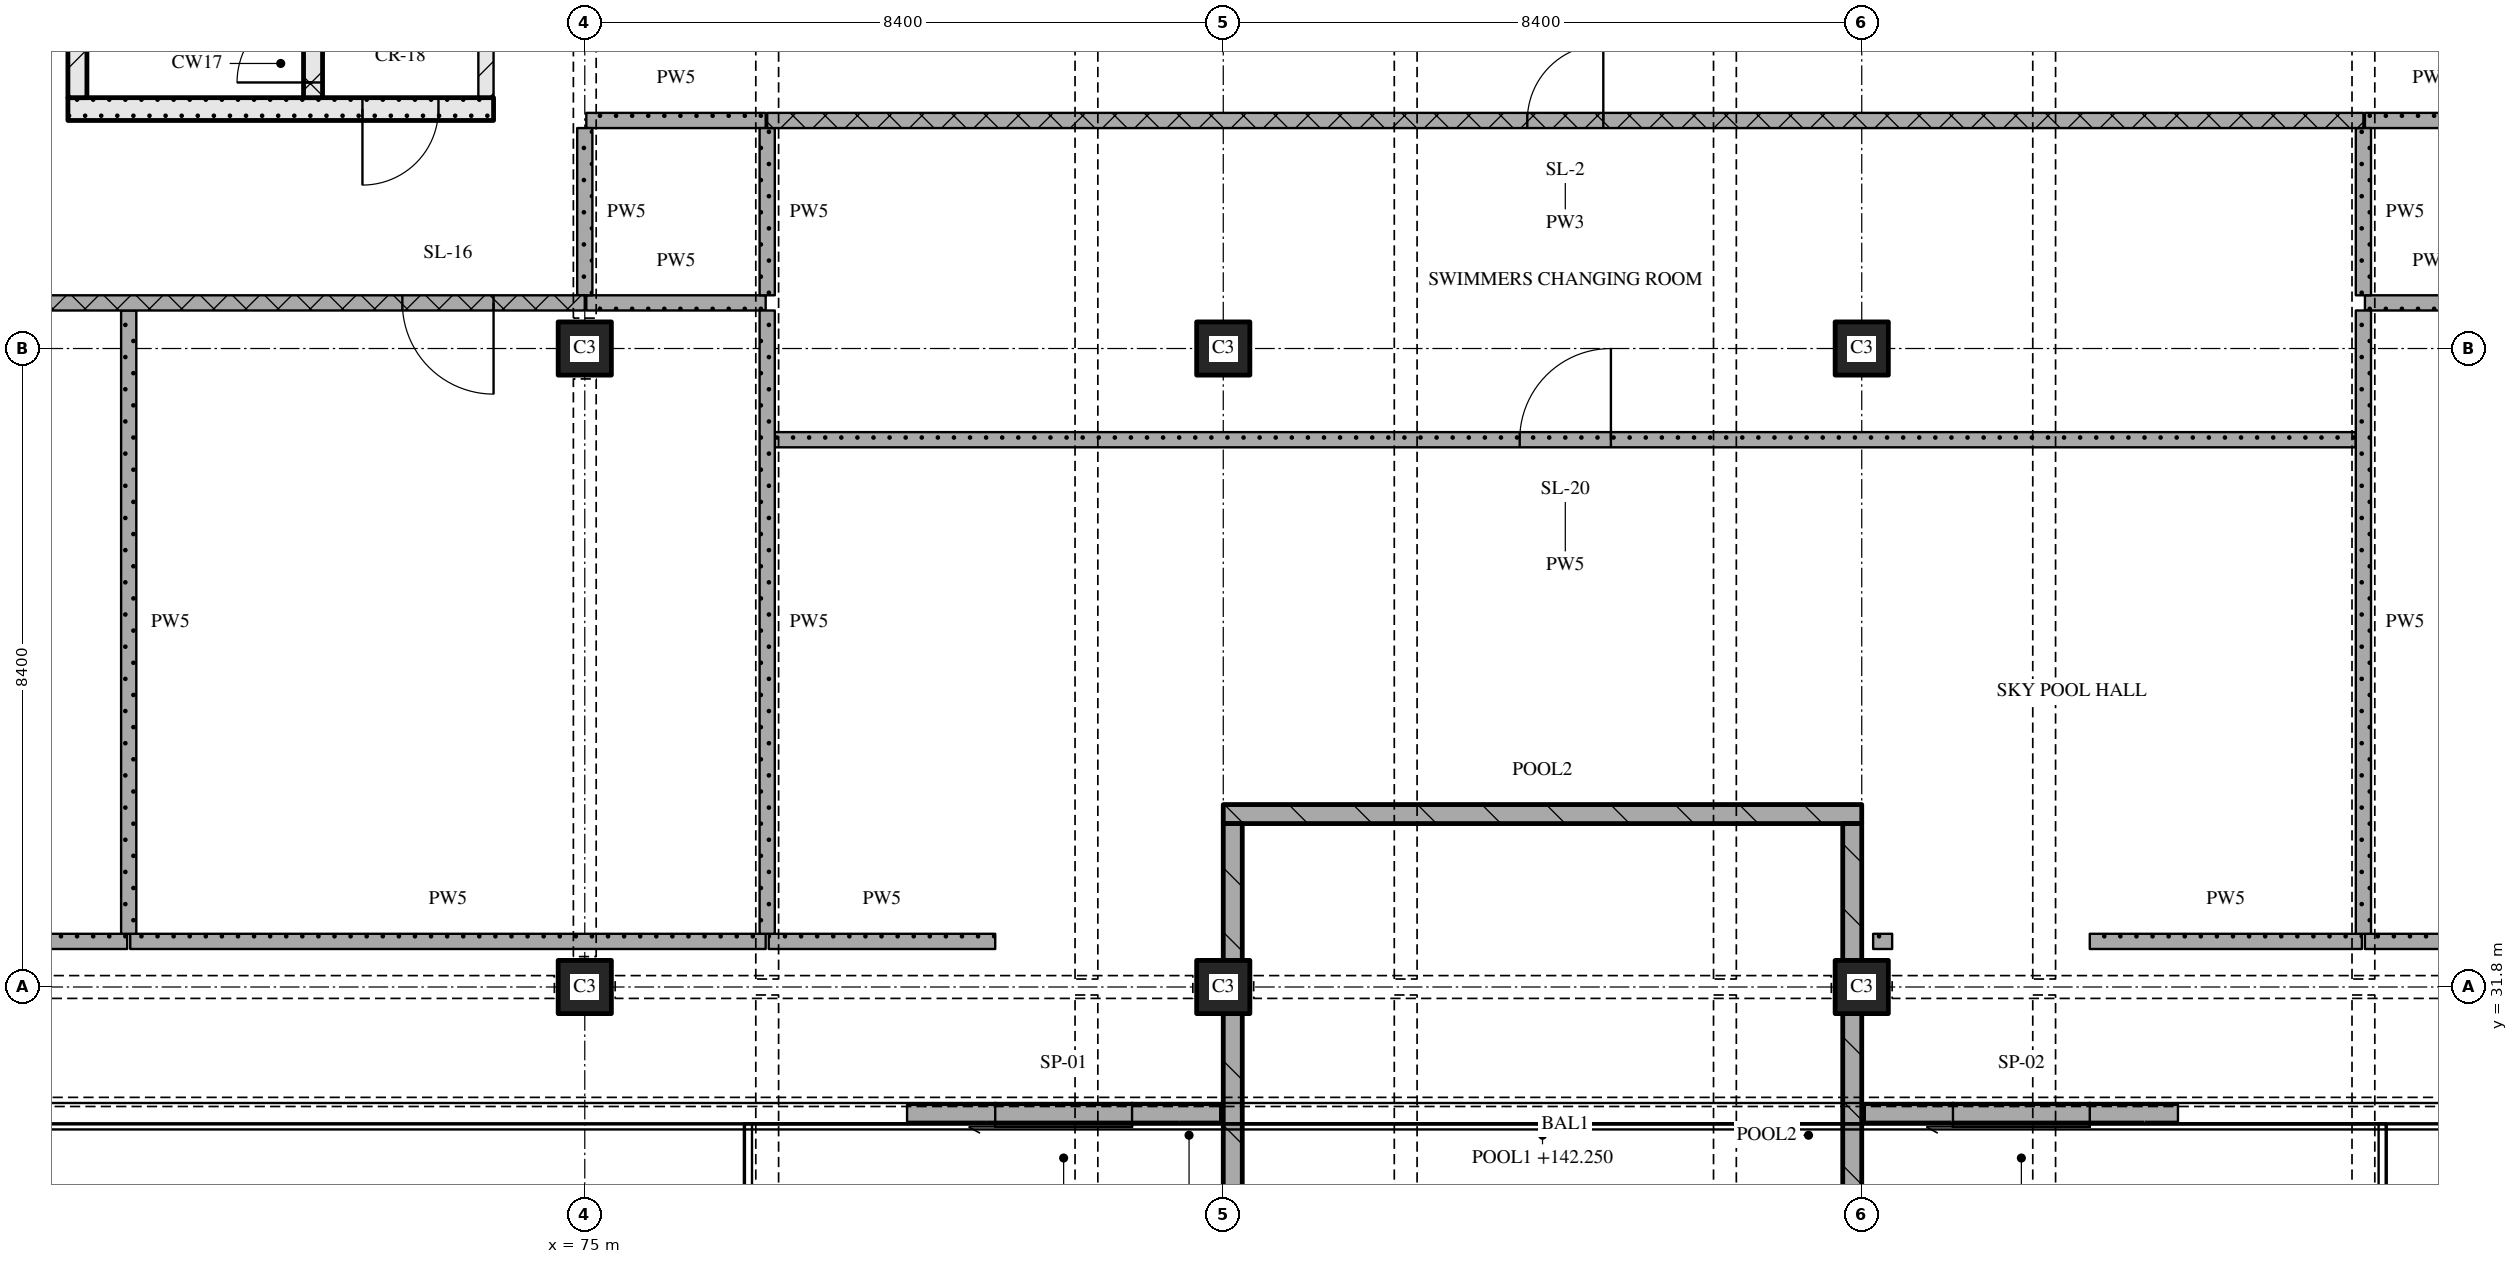
"""IFC4 building model, lengths in metres.
Left out: names, types, materials, properties, quantities, classifications, styles, units other than length and angle.
Written with IfcOpenShell. Run it as: python <this file> out.ifc"""

import sys

from ifc_helpers import new_model, si_unit, direction, frame, frame_2d, origin, origin_2d, place, context, subcontext, project, spatial, rectangle, extrude, element, fill, save


model = new_model("IFC4")
c1 = context("Model", 3, precision=1e-05, world=origin(), true_north=direction((0.0, 1.0)))
c2 = subcontext(c1, "Body", "Model", "MODEL_VIEW")
j1 = project(units=[si_unit("LENGTHUNIT", "METRE"), si_unit("PLANEANGLEUNIT", "RADIAN")], contexts=[c1])
p1 = place(None, origin())
s1 = spatial("IfcSite", under=j1, at=p1, CompositionType="ELEMENT")
p2 = place(p1, origin())
s2 = spatial("IfcBuilding", under=s1, at=p2, CompositionType="ELEMENT")
p3 = place(p2, frame((0.0, 0.0, 142.05)))
s3 = spatial("IfcBuildingStorey", under=s2, at=p3, CompositionType="ELEMENT", Elevation=142.05)
for number, where, z_axis, x_axis in (
    (1, (75.0, 31.8, 0.0), (0.0, 0.0, 1.0), (1.0, 0.0, 0.0)),
    (2, (75.0, 40.2, 0.0), (0.0, 0.0, 1.0), (1.0, 0.0, 0.0)),
    (3, (83.4, 31.8, 0.0), (0.0, 0.0, 1.0), (1.0, 0.0, 0.0)),
    (4, (83.4, 40.2, 0.0), (0.0, 0.0, 1.0), (1.0, 0.0, 0.0)),
    (5, (91.8, 31.8, 0.0), (0.0, 0.0, 1.0), (1.0, 0.0, 0.0)),
    (6, (91.8, 40.2, 0.0), (0.0, 0.0, 1.0), (1.0, 0.0, 0.0)),
):
    element("IfcColumn", number, at=place(p3, frame(where, z_axis=z_axis, x_axis=x_axis)), inside=s3, PredefinedType="COLUMN", context=c2, shape_type="SweptSolid", body=[
        extrude(rectangle(XDim=0.7, YDim=0.7, at=origin_2d()), origin(), (0.0, 0.0, 1.0), 5.4),
    ])
p4 = place(p3, frame((83.4, 34.075, 0.2), z_axis=(0.0, 0.0, 1.0), x_axis=(1.0, 0.0, 0.0)))
e7 = element("IfcWall", 7, at=p4, inside=s3, PredefinedType="SOLIDWALL", context=c2, shape_type="SweptSolid", body=[
    extrude(rectangle(XDim=8.4, YDim=0.25, at=frame_2d((4.2, 0.0))), origin(), (0.0, 0.0, 1.0), 1.4),
])
for number, where, z_axis, x_axis in (
    (8, (83.525, 25.75, 0.2), (0.0, 0.0, 1.0), (0.0, 1.0, 0.0)),
    (9, (91.675, 25.75, 0.2), (0.0, 0.0, 1.0), (0.0, 1.0, 0.0)),
):
    element("IfcWall", number, at=place(p3, frame(where, z_axis=z_axis, x_axis=x_axis)), inside=s3, PredefinedType="SOLIDWALL", context=c2, shape_type="SweptSolid", body=[
        extrude(rectangle(XDim=8.2, YDim=0.25, at=frame_2d((4.1, 0.0))), origin(), (0.0, 0.0, 1.0), 1.4),
    ])
p5 = place(p3, frame((83.36, 30.125, 0.0), z_axis=(0.0, 0.0, 1.0), x_axis=(-1.0, 0.0, 0.0)))
e10 = element("IfcWall", 10, at=p5, inside=s3, PredefinedType="SOLIDWALL", context=c2, shape_type="SweptSolid", body=[
    extrude(rectangle(XDim=4.12, YDim=0.25, at=frame_2d((2.06, 0.0))), origin(), (0.0, 0.0, 1.0), 5.12),
])
p6 = place(p5, frame((1.16, 0.0, 0.0)))
e11 = element("IfcOpeningElement", 11, at=p6, cuts=e10, PredefinedType="OPENING", context=c2, shape_type="SweptSolid", body=[
    extrude(rectangle(XDim=1.8, YDim=2.4, at=frame_2d((0.9, 1.2))), frame((0.0, 0.135, 0.0), z_axis=(0.0, -1.0, 0.0), x_axis=(1.0, 0.0, 0.0)), (0.0, 0.0, 1.0), 0.27),
])
p7 = place(p3, frame((95.96, 30.125, 0.0), z_axis=(0.0, 0.0, 1.0), x_axis=(-1.0, 0.0, 0.0)))
e12 = element("IfcWall", 12, at=p7, inside=s3, PredefinedType="SOLIDWALL", context=c2, shape_type="SweptSolid", body=[
    extrude(rectangle(XDim=4.12, YDim=0.25, at=frame_2d((2.06, 0.0))), origin(), (0.0, 0.0, 1.0), 5.12),
])
p8 = place(p7, frame((1.16, 0.0, 0.0)))
e13 = element("IfcOpeningElement", 13, at=p8, cuts=e12, PredefinedType="OPENING", context=c2, shape_type="SweptSolid", body=[
    extrude(rectangle(XDim=1.8, YDim=2.4, at=frame_2d((0.9, 1.2))), frame((0.0, 0.135, 0.0), z_axis=(0.0, -1.0, 0.0), x_axis=(1.0, 0.0, 0.0)), (0.0, 0.0, 1.0), 0.27),
])
p9 = place(p3, frame((68.2, 43.35, 0.0), z_axis=(0.0, 0.0, 1.0), x_axis=(1.0, 0.0, 0.0)))
e14 = element("IfcWall", 14, at=p9, inside=s3, PredefinedType="SOLIDWALL", context=c2, shape_type="SweptSolid", body=[
    extrude(rectangle(XDim=5.6, YDim=0.3, at=frame_2d((2.8, 0.0))), origin(), (0.0, 0.0, 1.0), 5.12),
])
p10 = place(p9, frame((3.875, 0.0, 0.0)))
e15 = element("IfcOpeningElement", 15, at=p10, cuts=e14, PredefinedType="OPENING", context=c2, shape_type="SweptSolid", body=[
    extrude(rectangle(XDim=1.0, YDim=2.1, at=frame_2d((0.5, 1.05))), frame((0.0, 0.16, 0.0), z_axis=(0.0, -1.0, 0.0), x_axis=(1.0, 0.0, 0.0)), (0.0, 0.0, 1.0), 0.32),
])
p11 = place(p3, frame((68.325, 43.5, 0.0), z_axis=(0.0, 0.0, 1.0), x_axis=(0.0, 1.0, 0.0)))
e16 = element("IfcWall", 16, at=p11, inside=s3, PredefinedType="SOLIDWALL", context=c2, shape_type="SweptSolid", body=[
    extrude(rectangle(XDim=6.9, YDim=0.25, at=frame_2d((3.45, 0.0))), origin(), (0.0, 0.0, 1.0), 5.12),
])
p12 = place(p3, frame((71.425, 43.5, 0.0), z_axis=(0.0, 0.0, 1.0), x_axis=(0.0, 1.0, 0.0)))
e17 = element("IfcWall", 17, at=p12, inside=s3, PredefinedType="SOLIDWALL", context=c2, shape_type="SweptSolid", body=[
    extrude(rectangle(XDim=6.9, YDim=0.25, at=frame_2d((3.45, 0.0))), origin(), (0.0, 0.0, 1.0), 5.12),
])
p13 = place(p12, frame((0.2, 0.0, 0.0)))
e18 = element("IfcOpeningElement", 18, at=p13, cuts=e17, PredefinedType="OPENING", context=c2, shape_type="SweptSolid", body=[
    extrude(rectangle(XDim=1.0, YDim=2.1, at=frame_2d((0.5, 1.05))), frame((0.0, 0.135, 0.0), z_axis=(0.0, -1.0, 0.0), x_axis=(1.0, 0.0, 0.0)), (0.0, 0.0, 1.0), 0.27),
])
p14 = place(p3, frame((73.7, 43.5, 0.0), z_axis=(0.0, 0.0, 1.0), x_axis=(0.0, 1.0, 0.0)))
e19 = element("IfcWall", 19, at=p14, inside=s3, PredefinedType="PARTITIONING", context=c2, shape_type="SweptSolid", body=[
    extrude(rectangle(XDim=6.9, YDim=0.2, at=frame_2d((3.45, 0.0))), origin(), (0.0, 0.0, 1.0), 5.12),
])
p15 = place(p14, frame((1.0, 0.0, 0.0)))
e20 = element("IfcOpeningElement", 20, at=p15, cuts=e19, PredefinedType="OPENING", context=c2, shape_type="SweptSolid", body=[
    extrude(rectangle(XDim=1.0, YDim=2.1, at=frame_2d((0.5, 1.05))), frame((0.0, 0.11, 0.0), z_axis=(0.0, -1.0, 0.0), x_axis=(1.0, 0.0, 0.0)), (0.0, 0.0, 1.0), 0.22),
])
p16 = place(p3, frame((59.12, 32.4, 0.0), z_axis=(0.0, 0.0, 1.0), x_axis=(1.0, 0.0, 0.0)))
e21 = element("IfcWall", 21, at=p16, inside=s3, PredefinedType="PARTITIONING", context=c2, shape_type="SweptSolid", body=[
    extrude(rectangle(XDim=9.86, YDim=0.2, at=frame_2d((4.93, 0.0))), origin(), (0.0, 0.0, 1.0), 5.12),
])
p17 = place(p3, frame((69.02, 32.4, 0.0), z_axis=(0.0, 0.0, 1.0), x_axis=(1.0, 0.0, 0.0)))
e22 = element("IfcWall", 22, at=p17, inside=s3, PredefinedType="PARTITIONING", context=c2, shape_type="SweptSolid", body=[
    extrude(rectangle(XDim=8.36, YDim=0.2, at=frame_2d((4.18, 0.0))), origin(), (0.0, 0.0, 1.0), 5.12),
])
p18 = place(p3, frame((77.42, 32.4, 0.0), z_axis=(0.0, 0.0, 1.0), x_axis=(1.0, 0.0, 0.0)))
e23 = element("IfcWall", 23, at=p18, inside=s3, PredefinedType="PARTITIONING", context=c2, shape_type="SweptSolid", body=[
    extrude(rectangle(XDim=2.98, YDim=0.2, at=frame_2d((1.49, 0.0))), origin(), (0.0, 0.0, 1.0), 5.12),
])
p19 = place(p3, frame((91.95, 32.4, 0.0), z_axis=(0.0, 0.0, 1.0), x_axis=(1.0, 0.0, 0.0)))
e24 = element("IfcWall", 24, at=p19, inside=s3, PredefinedType="PARTITIONING", context=c2, shape_type="SweptSolid", body=[
    extrude(rectangle(XDim=0.25, YDim=0.2, at=frame_2d((0.125, 0.0))), origin(), (0.0, 0.0, 1.0), 5.12),
])
p20 = place(p3, frame((94.8, 32.4, 0.0), z_axis=(0.0, 0.0, 1.0), x_axis=(1.0, 0.0, 0.0)))
e25 = element("IfcWall", 25, at=p20, inside=s3, PredefinedType="PARTITIONING", context=c2, shape_type="SweptSolid", body=[
    extrude(rectangle(XDim=3.58, YDim=0.2, at=frame_2d((1.79, 0.0))), origin(), (0.0, 0.0, 1.0), 5.12),
])
p21 = place(p3, frame((98.42, 32.4, 0.0), z_axis=(0.0, 0.0, 1.0), x_axis=(1.0, 0.0, 0.0)))
e26 = element("IfcWall", 26, at=p21, inside=s3, PredefinedType="PARTITIONING", context=c2, shape_type="SweptSolid", body=[
    extrude(rectangle(XDim=8.36, YDim=0.2, at=frame_2d((4.18, 0.0))), origin(), (0.0, 0.0, 1.0), 5.12),
])
p22 = place(p3, frame((98.3, 39.0, 0.0), z_axis=(0.0, 0.0, 1.0), x_axis=(-1.0, 0.0, 0.0)))
e27 = element("IfcWall", 27, at=p22, inside=s3, PredefinedType="PARTITIONING", context=c2, shape_type="SweptSolid", body=[
    extrude(rectangle(XDim=20.8, YDim=0.2, at=frame_2d((10.4, 0.0))), origin(), (0.0, 0.0, 1.0), 5.12),
])
p23 = place(p22, frame((9.8, 0.0, 0.0)))
e28 = element("IfcOpeningElement", 28, at=p23, cuts=e27, PredefinedType="OPENING", context=c2, shape_type="SweptSolid", body=[
    extrude(rectangle(XDim=1.2, YDim=2.1, at=frame_2d((0.6, 1.05))), frame((0.0, 0.11, 0.0), z_axis=(0.0, -1.0, 0.0), x_axis=(1.0, 0.0, 0.0)), (0.0, 0.0, 1.0), 0.22),
])
p24 = place(p3, frame((75.0, 40.8, 0.0), z_axis=(0.0, 0.0, 1.0), x_axis=(-1.0, 0.0, 0.0)))
e29 = element("IfcWall", 29, at=p24, inside=s3, PredefinedType="PARTITIONING", context=c2, shape_type="SweptSolid", body=[
    extrude(rectangle(XDim=23.749, YDim=0.2, at=frame_2d((11.874, 0.0))), origin(), (0.0, 0.0, 1.0), 5.12),
])
p25 = place(p24, frame((1.2, 0.0, 0.0)))
e30 = element("IfcOpeningElement", 30, at=p25, cuts=e29, PredefinedType="OPENING", context=c2, shape_type="SweptSolid", body=[
    extrude(rectangle(XDim=1.2, YDim=2.1, at=frame_2d((0.6, 1.05))), frame((0.0, 0.11, 0.0), z_axis=(0.0, -1.0, 0.0), x_axis=(1.0, 0.0, 0.0)), (0.0, 0.0, 1.0), 0.22),
])
p26 = place(p24, frame((10.751, 0.0, 0.0)))
e31 = element("IfcOpeningElement", 31, at=p26, cuts=e29, PredefinedType="OPENING", context=c2, shape_type="SweptSolid", body=[
    extrude(rectangle(XDim=1.2, YDim=2.1, at=frame_2d((0.6, 1.05))), frame((0.0, 0.11, 0.0), z_axis=(0.0, -1.0, 0.0), x_axis=(1.0, 0.0, 0.0)), (0.0, 0.0, 1.0), 0.22),
])
p27 = place(p24, frame((18.45, 0.0, 0.0)))
e32 = element("IfcOpeningElement", 32, at=p27, cuts=e29, PredefinedType="OPENING", context=c2, shape_type="SweptSolid", body=[
    extrude(rectangle(XDim=1.2, YDim=2.1, at=frame_2d((0.6, 1.05))), frame((0.0, 0.11, 0.0), z_axis=(0.0, -1.0, 0.0), x_axis=(1.0, 0.0, 0.0)), (0.0, 0.0, 1.0), 0.22),
])
p28 = place(p3, frame((75.02, 40.8, 0.0), z_axis=(0.0, 0.0, 1.0), x_axis=(1.0, 0.0, 0.0)))
e33 = element("IfcWall", 33, at=p28, inside=s3, PredefinedType="PARTITIONING", context=c2, shape_type="SweptSolid", body=[
    extrude(rectangle(XDim=2.36, YDim=0.2, at=frame_2d((1.18, 0.0))), origin(), (0.0, 0.0, 1.0), 5.12),
])
p29 = place(p3, frame((98.42, 40.8, 0.0), z_axis=(0.0, 0.0, 1.0), x_axis=(1.0, 0.0, 0.0)))
e34 = element("IfcWall", 34, at=p29, inside=s3, PredefinedType="PARTITIONING", context=c2, shape_type="SweptSolid", body=[
    extrude(rectangle(XDim=1.76, YDim=0.2, at=frame_2d((0.88, 0.0))), origin(), (0.0, 0.0, 1.0), 5.12),
])
p30 = place(p3, frame((98.4, 43.2, 0.0), z_axis=(0.0, 0.0, 1.0), x_axis=(-1.0, 0.0, 0.0)))
e35 = element("IfcWall", 35, at=p30, inside=s3, PredefinedType="PARTITIONING", context=c2, shape_type="SweptSolid", body=[
    extrude(rectangle(XDim=21.0, YDim=0.2, at=frame_2d((10.5, 0.0))), origin(), (0.0, 0.0, 1.0), 5.12),
])
p31 = place(p30, frame((10.0, 0.0, 0.0)))
e36 = element("IfcOpeningElement", 36, at=p31, cuts=e35, PredefinedType="OPENING", context=c2, shape_type="SweptSolid", body=[
    extrude(rectangle(XDim=1.0, YDim=2.1, at=frame_2d((0.5, 1.05))), frame((0.0, 0.11, 0.0), z_axis=(0.0, -1.0, 0.0), x_axis=(1.0, 0.0, 0.0)), (0.0, 0.0, 1.0), 0.22),
])
p32 = place(p3, frame((75.02, 43.2, 0.0), z_axis=(0.0, 0.0, 1.0), x_axis=(1.0, 0.0, 0.0)))
e37 = element("IfcWall", 37, at=p32, inside=s3, PredefinedType="PARTITIONING", context=c2, shape_type="SweptSolid", body=[
    extrude(rectangle(XDim=2.36, YDim=0.2, at=frame_2d((1.18, 0.0))), origin(), (0.0, 0.0, 1.0), 5.12),
])
p33 = place(p3, frame((98.42, 43.2, 0.0), z_axis=(0.0, 0.0, 1.0), x_axis=(1.0, 0.0, 0.0)))
e38 = element("IfcWall", 38, at=p33, inside=s3, PredefinedType="PARTITIONING", context=c2, shape_type="SweptSolid", body=[
    extrude(rectangle(XDim=1.76, YDim=0.2, at=frame_2d((0.88, 0.0))), origin(), (0.0, 0.0, 1.0), 5.12),
])
p34 = place(p3, frame((69.0, 40.7, 0.0), z_axis=(0.0, 0.0, 1.0), x_axis=(0.0, -1.0, 0.0)))
e39 = element("IfcWall", 39, at=p34, inside=s3, PredefinedType="PARTITIONING", context=c2, shape_type="SweptSolid", body=[
    extrude(rectangle(XDim=8.2, YDim=0.2, at=frame_2d((4.1, 0.0))), origin(), (0.0, 0.0, 1.0), 5.12),
])
p35 = place(p3, frame((75.0, 43.1, 0.0), z_axis=(0.0, 0.0, 1.0), x_axis=(0.0, -1.0, 0.0)))
e40 = element("IfcWall", 40, at=p35, inside=s3, PredefinedType="PARTITIONING", context=c2, shape_type="SweptSolid", body=[
    extrude(rectangle(XDim=2.2, YDim=0.2, at=frame_2d((1.1, 0.0))), origin(), (0.0, 0.0, 1.0), 4.23),
])
p36 = place(p3, frame((77.4, 43.1, 0.0), z_axis=(0.0, 0.0, 1.0), x_axis=(0.0, -1.0, 0.0)))
e41 = element("IfcWall", 41, at=p36, inside=s3, PredefinedType="PARTITIONING", context=c2, shape_type="SweptSolid", body=[
    extrude(rectangle(XDim=2.2, YDim=0.2, at=frame_2d((1.1, 0.0))), origin(), (0.0, 0.0, 1.0), 5.12),
])
p37 = place(p3, frame((77.4, 40.7, 0.0), z_axis=(0.0, 0.0, 1.0), x_axis=(0.0, -1.0, 0.0)))
e42 = element("IfcWall", 42, at=p37, inside=s3, PredefinedType="PARTITIONING", context=c2, shape_type="SweptSolid", body=[
    extrude(rectangle(XDim=8.2, YDim=0.2, at=frame_2d((4.1, 0.0))), origin(), (0.0, 0.0, 1.0), 5.12),
])
p38 = place(p3, frame((98.4, 43.1, 0.0), z_axis=(0.0, 0.0, 1.0), x_axis=(0.0, -1.0, 0.0)))
e43 = element("IfcWall", 43, at=p38, inside=s3, PredefinedType="PARTITIONING", context=c2, shape_type="SweptSolid", body=[
    extrude(rectangle(XDim=2.2, YDim=0.2, at=frame_2d((1.1, 0.0))), origin(), (0.0, 0.0, 1.0), 5.12),
])
p39 = place(p3, frame((98.4, 40.7, 0.0), z_axis=(0.0, 0.0, 1.0), x_axis=(0.0, -1.0, 0.0)))
e44 = element("IfcWall", 44, at=p39, inside=s3, PredefinedType="PARTITIONING", context=c2, shape_type="SweptSolid", body=[
    extrude(rectangle(XDim=8.2, YDim=0.2, at=frame_2d((4.1, 0.0))), origin(), (0.0, 0.0, 1.0), 5.12),
])
p40 = place(p6, origin())
e45 = element("IfcDoor", 45, at=p40, inside=s3, OperationType="SLIDING_TO_LEFT", PredefinedType="DOOR", context=c2, shape_type="SweptSolid", body=[
    extrude(rectangle(XDim=1.8, YDim=2.4, at=frame_2d((0.9, 1.2))), frame((0.0, 0.025, 0.0), z_axis=(0.0, -1.0, 0.0), x_axis=(1.0, 0.0, 0.0)), (0.0, 0.0, 1.0), 0.05),
])
fill(e11, e45)
p41 = place(p8, origin())
e46 = element("IfcDoor", 46, at=p41, inside=s3, OperationType="SLIDING_TO_LEFT", PredefinedType="DOOR", context=c2, shape_type="SweptSolid", body=[
    extrude(rectangle(XDim=1.8, YDim=2.4, at=frame_2d((0.9, 1.2))), frame((0.0, 0.025, 0.0), z_axis=(0.0, -1.0, 0.0), x_axis=(1.0, 0.0, 0.0)), (0.0, 0.0, 1.0), 0.05),
])
fill(e13, e46)
p42 = place(p10, origin())
e47 = element("IfcDoor", 47, at=p42, inside=s3, OperationType="SINGLE_SWING_RIGHT", PredefinedType="DOOR", context=c2, shape_type="SweptSolid", body=[
    extrude(rectangle(XDim=1.0, YDim=2.1, at=frame_2d((0.5, 1.05))), frame((0.0, 0.025, 0.0), z_axis=(0.0, -1.0, 0.0), x_axis=(1.0, 0.0, 0.0)), (0.0, 0.0, 1.0), 0.05),
])
fill(e15, e47)
p43 = place(p13, origin())
e48 = element("IfcDoor", 48, at=p43, inside=s3, OperationType="SINGLE_SWING_LEFT", PredefinedType="DOOR", context=c2, shape_type="SweptSolid", body=[
    extrude(rectangle(XDim=1.0, YDim=2.1, at=frame_2d((0.5, 1.05))), frame((0.0, 0.025, 0.0), z_axis=(0.0, -1.0, 0.0), x_axis=(1.0, 0.0, 0.0)), (0.0, 0.0, 1.0), 0.05),
])
fill(e18, e48)
p44 = place(p23, origin())
e49 = element("IfcDoor", 49, at=p44, inside=s3, OperationType="SINGLE_SWING_RIGHT", PredefinedType="DOOR", context=c2, shape_type="SweptSolid", body=[
    extrude(rectangle(XDim=1.2, YDim=2.1, at=frame_2d((0.6, 1.05))), frame((0.0, 0.025, 0.0), z_axis=(0.0, -1.0, 0.0), x_axis=(1.0, 0.0, 0.0)), (0.0, 0.0, 1.0), 0.05),
])
fill(e28, e49)
p45 = place(p25, origin())
e50 = element("IfcDoor", 50, at=p45, inside=s3, OperationType="SINGLE_SWING_LEFT", PredefinedType="DOOR", context=c2, shape_type="SweptSolid", body=[
    extrude(rectangle(XDim=1.2, YDim=2.1, at=frame_2d((0.6, 1.05))), frame((0.0, 0.025, 0.0), z_axis=(0.0, -1.0, 0.0), x_axis=(1.0, 0.0, 0.0)), (0.0, 0.0, 1.0), 0.05),
])
fill(e30, e50)
p46 = place(p31, origin())
e51 = element("IfcDoor", 51, at=p46, inside=s3, OperationType="SINGLE_SWING_RIGHT", PredefinedType="DOOR", context=c2, shape_type="SweptSolid", body=[
    extrude(rectangle(XDim=1.0, YDim=2.1, at=frame_2d((0.5, 1.05))), frame((0.0, 0.025, 0.0), z_axis=(0.0, -1.0, 0.0), x_axis=(1.0, 0.0, 0.0)), (0.0, 0.0, 1.0), 0.05),
])
fill(e36, e51)
save(model, sys.argv[1])
